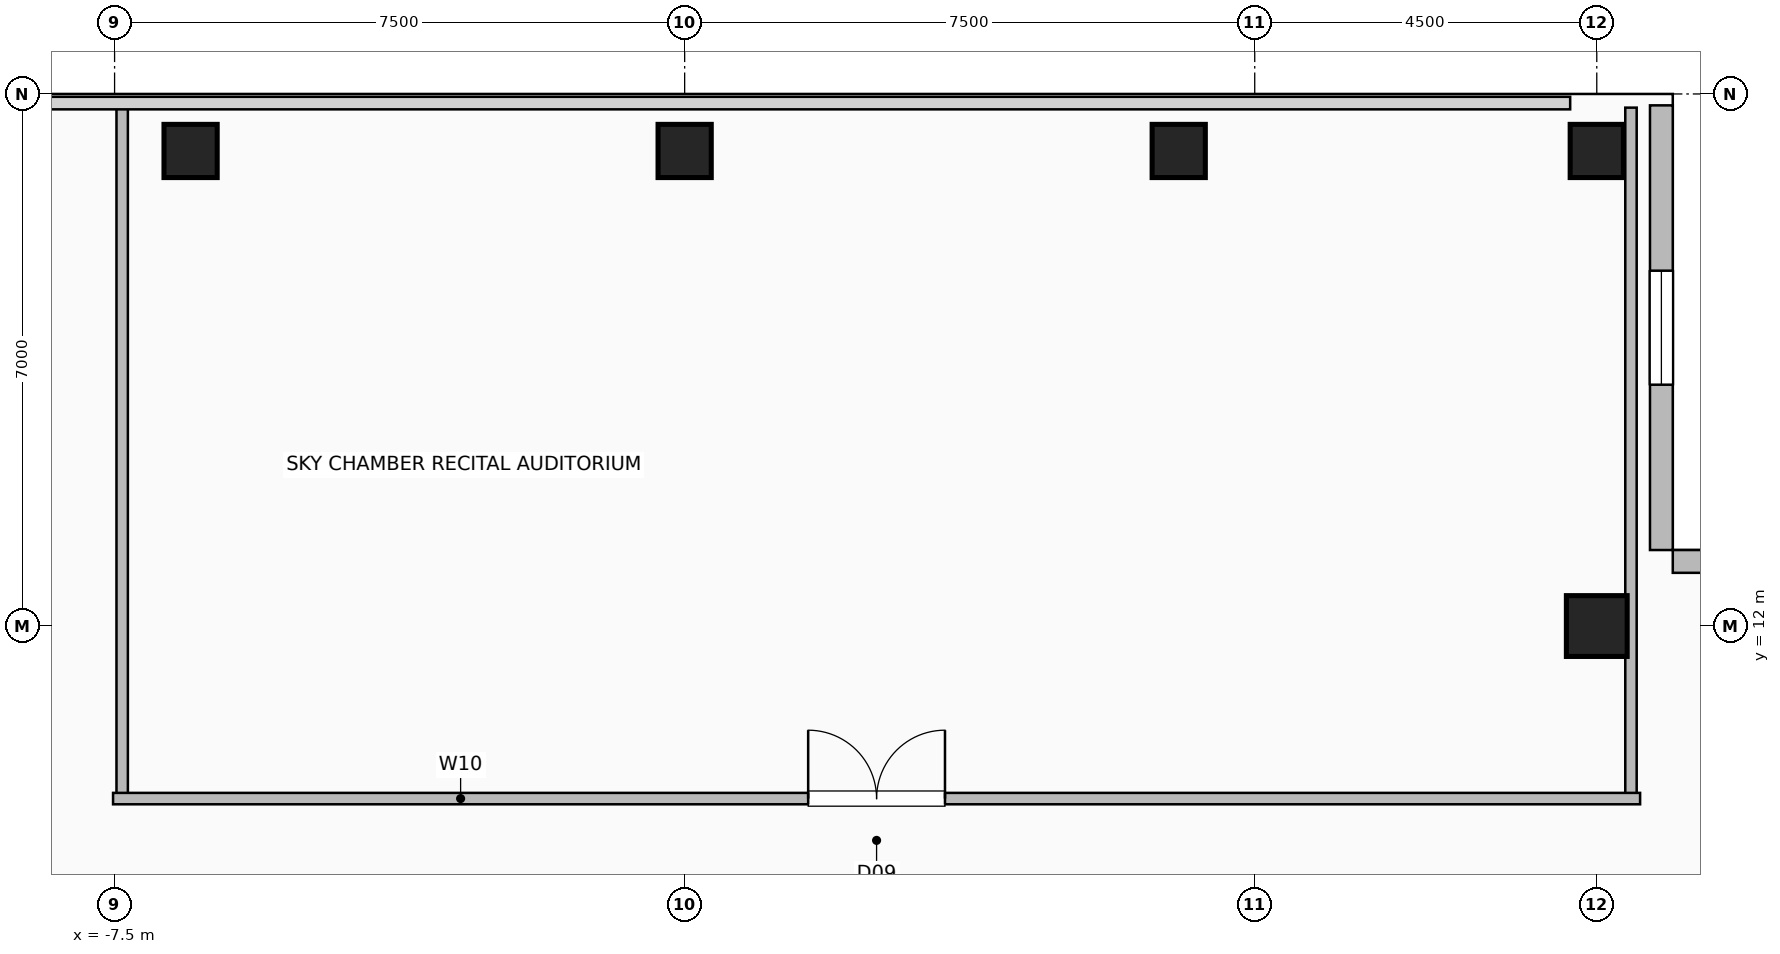
"""IFC4 building model, lengths in metres.
Left out: names, types, materials, properties, quantities, classifications, styles, units other than length and angle.
Written with IfcOpenShell. Run it as: python <this file> out.ifc"""

import sys

from ifc_helpers import new_model, si_unit, direction, frame, frame_2d, origin, origin_2d, place, context, subcontext, project, spatial, rectangle, hollow_rectangle, extrude, element, fill, save


model = new_model("IFC4")
c1 = context("Model", 3, precision=1e-05, world=origin(), true_north=direction((0.0, 1.0)))
c2 = subcontext(c1, "Body", "Model", "MODEL_VIEW")
j1 = project(units=[si_unit("LENGTHUNIT", "METRE"), si_unit("PLANEANGLEUNIT", "RADIAN")], contexts=[c1])
p1 = place(None, origin())
s1 = spatial("IfcSite", under=j1, at=p1, CompositionType="ELEMENT")
p2 = place(p1, origin())
s2 = spatial("IfcBuilding", under=s1, at=p2, CompositionType="ELEMENT")
p3 = place(p2, frame((0.0, 0.0, 286.4)))
s3 = spatial("IfcBuildingStorey", under=s2, at=p3, CompositionType="ELEMENT", Elevation=286.4)
for number, where, z_axis, x_axis in (
    (1, (-6.5, 18.25, 0.0), (0.0, 0.0, 1.0), (1.0, 0.0, 0.0)),
    (2, (0.0, 18.25, 0.0), (0.0, 0.0, 1.0), (1.0, 0.0, 0.0)),
    (3, (6.5, 18.25, 0.0), (0.0, 0.0, 1.0), (1.0, 0.0, 0.0)),
    (4, (12.0, 18.25, 0.0), (0.0, 0.0, 1.0), (1.0, 0.0, 0.0)),
):
    element("IfcColumn", number, at=place(p3, frame(where, z_axis=z_axis, x_axis=x_axis)), inside=s3, PredefinedType="COLUMN", context=c2, shape_type="SweptSolid", body=[
        extrude(hollow_rectangle(XDim=0.7, YDim=0.7, WallThickness=0.035, at=origin_2d()), origin(), (0.0, 0.0, 1.0), 3.6),
    ])
p4 = place(p3, frame((12.0, 12.0, 0.0), z_axis=(0.0, 0.0, 1.0), x_axis=(1.0, 0.0, 0.0)))
e5 = element("IfcColumn", 5, at=p4, inside=s3, PredefinedType="COLUMN", context=c2, shape_type="SweptSolid", body=[
    extrude(hollow_rectangle(XDim=0.8, YDim=0.8, WallThickness=0.04, at=origin_2d()), origin(), (0.0, 0.0, 1.0), 3.6),
])
p5 = place(p3, frame((12.85, 18.85, 0.0), z_axis=(0.0, 0.0, 1.0), x_axis=(0.0, -1.0, 0.0)))
e6 = element("IfcWall", 6, at=p5, inside=s3, PredefinedType="SOLIDWALL", context=c2, shape_type="SweptSolid", body=[
    extrude(rectangle(XDim=5.85, YDim=0.3, at=frame_2d((2.925, 0.0))), origin(), (0.0, 0.0, 1.0), 3.36),
])
p6 = place(p5, frame((2.175, 0.0, 0.9)))
e7 = element("IfcOpeningElement", 7, at=p6, cuts=e6, PredefinedType="OPENING", context=c2, shape_type="SweptSolid", body=[
    extrude(rectangle(XDim=1.5, YDim=1.8, at=frame_2d((0.75, 0.9))), frame((0.0, 0.16, 0.0), z_axis=(0.0, -1.0, 0.0), x_axis=(1.0, 0.0, 0.0)), (0.0, 0.0, 1.0), 0.32),
])
p7 = place(p3, frame((18.85, 12.85, 0.0), z_axis=(0.0, 0.0, 1.0), x_axis=(-1.0, 0.0, 0.0)))
e8 = element("IfcWall", 8, at=p7, inside=s3, PredefinedType="SOLIDWALL", context=c2, shape_type="SweptSolid", body=[
    extrude(rectangle(XDim=5.85, YDim=0.3, at=frame_2d((2.925, 0.0))), origin(), (0.0, 0.0, 1.0), 3.36),
])
for number, where, z_axis, x_axis in (
    (9, (-7.4, 9.73, 0.0), (0.0, 0.0, 1.0), (0.0, 1.0, 0.0)),
    (10, (12.45, 9.73, 0.0), (0.0, 0.0, 1.0), (0.0, 1.0, 0.0)),
):
    element("IfcWall", number, at=place(p3, frame(where, z_axis=z_axis, x_axis=x_axis)), inside=s3, PredefinedType="PARTITIONING", context=c2, shape_type="SweptSolid", body=[
        extrude(rectangle(XDim=9.09, YDim=0.15, at=frame_2d((4.545, 0.0))), origin(), (0.0, 0.0, 1.0), 3.36),
    ])
p8 = place(p3, frame((-7.52, 9.73, 0.0), z_axis=(0.0, 0.0, 1.0), x_axis=(1.0, 0.0, 0.0)))
e11 = element("IfcWall", 11, at=p8, inside=s3, PredefinedType="PARTITIONING", context=c2, shape_type="SweptSolid", body=[
    extrude(rectangle(XDim=20.09, YDim=0.15, at=frame_2d((10.045, 0.0))), origin(), (0.0, 0.0, 1.0), 3.36),
])
p9 = place(p8, frame((9.145, 0.0, 0.0)))
e12 = element("IfcOpeningElement", 12, at=p9, cuts=e11, PredefinedType="OPENING", context=c2, shape_type="SweptSolid", body=[
    extrude(rectangle(XDim=1.8, YDim=2.08, at=frame_2d((0.9, 1.04))), frame((0.0, 0.085, 0.0), z_axis=(0.0, -1.0, 0.0), x_axis=(1.0, 0.0, 0.0)), (0.0, 0.0, 1.0), 0.17),
])
p10 = place(p6, origin())
e13 = element("IfcWindow", 13, at=p10, inside=s3, PartitioningType="SINGLE_PANEL", PredefinedType="WINDOW", context=c2, shape_type="SweptSolid", body=[
    extrude(rectangle(XDim=1.5, YDim=1.8, at=frame_2d((0.75, 0.9))), frame((0.0, 0.03, 0.0), z_axis=(0.0, -1.0, 0.0), x_axis=(1.0, 0.0, 0.0)), (0.0, 0.0, 1.0), 0.06),
])
fill(e7, e13)
p11 = place(p9, origin())
e14 = element("IfcDoor", 14, at=p11, inside=s3, OperationType="DOUBLE_DOOR_SINGLE_SWING", PredefinedType="DOOR", context=c2, shape_type="SweptSolid", body=[
    extrude(rectangle(XDim=1.8, YDim=2.08, at=frame_2d((0.9, 1.04))), frame((0.0, 0.025, 0.0), z_axis=(0.0, -1.0, 0.0), x_axis=(1.0, 0.0, 0.0)), (0.0, 0.0, 1.0), 0.05),
])
fill(e12, e14)
save(model, sys.argv[1])
